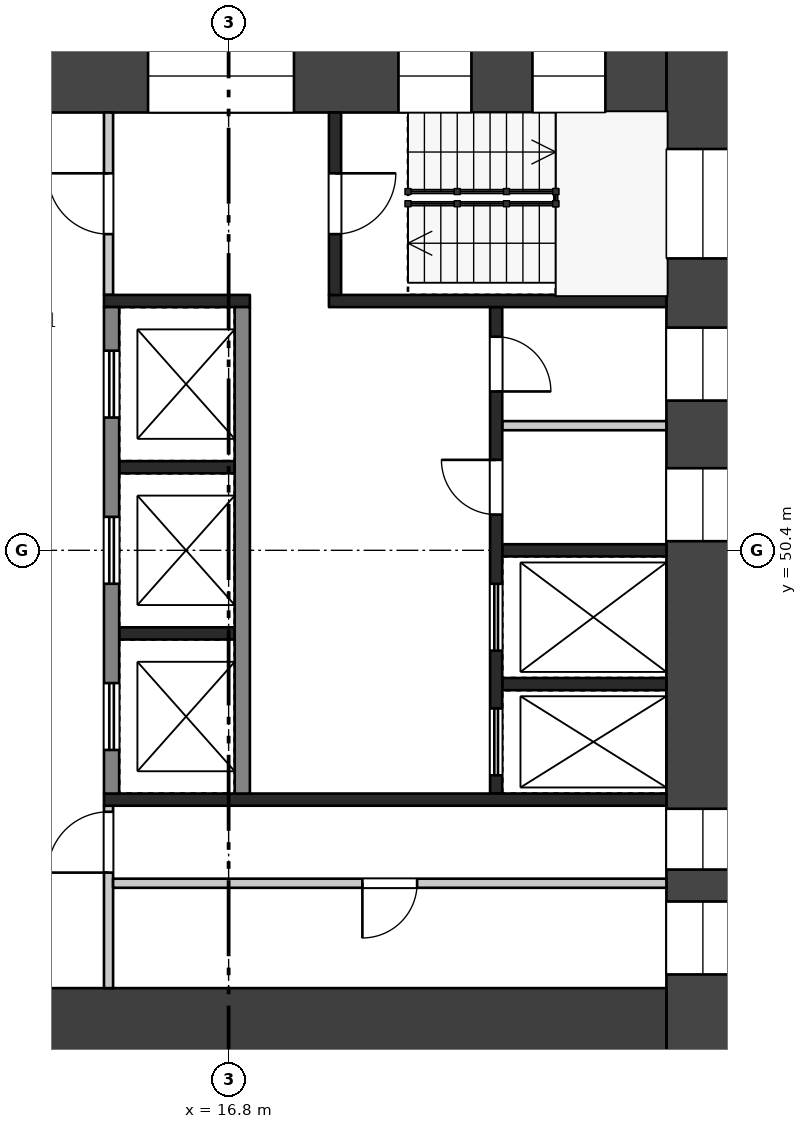
"""IFC4 building model, lengths in metres.
Left out: names, types, materials, properties, quantities, classifications, styles, units other than length and angle.
Written with IfcOpenShell. Run it as: python <this file> out.ifc"""

import sys

from ifc_helpers import new_model, si_unit, direction, frame, frame_2d, origin, place, context, subcontext, project, spatial, rectangle, extrude, element, fill, save


model = new_model("IFC4")
c1 = context("Model", 3, precision=1e-05, world=origin(), true_north=direction((0.0, 1.0)))
c2 = subcontext(c1, "Body", "Model", "MODEL_VIEW")
j1 = project(units=[si_unit("LENGTHUNIT", "METRE"), si_unit("PLANEANGLEUNIT", "RADIAN")], contexts=[c1])
p1 = place(None, origin())
s1 = spatial("IfcSite", under=j1, at=p1, CompositionType="ELEMENT")
p2 = place(p1, origin())
s2 = spatial("IfcBuilding", under=s1, at=p2, CompositionType="ELEMENT")
p3 = place(p2, frame((0.0, 0.0, 168.7)))
s3 = spatial("IfcBuildingStorey", under=s2, at=p3, CompositionType="ELEMENT", Elevation=168.7)
p4 = place(p3, frame((24.6, 58.8, 0.0), z_axis=(0.0, 0.0, 1.0), x_axis=(0.0, -1.0, 0.0)))
e1 = element("IfcWall", 1, at=p4, inside=s3, PredefinedType="SHEAR", context=c2, shape_type="SweptSolid", body=[
    extrude(rectangle(XDim=16.8, YDim=1.2, at=frame_2d((8.4, 0.0))), origin(), (0.0, 0.0, 1.0), 3.22),
])
p5 = place(p4, frame((1.8, 0.0, 0.5)))
e2 = element("IfcOpeningElement", 2, at=p5, cuts=e1, PredefinedType="OPENING", context=c2, shape_type="SweptSolid", body=[
    extrude(rectangle(XDim=1.8, YDim=2.4, at=frame_2d((0.9, 1.2))), frame((0.0, 0.61, 0.0), z_axis=(0.0, -1.0, 0.0), x_axis=(1.0, 0.0, 0.0)), (0.0, 0.0, 1.0), 1.22),
])
p6 = place(p4, frame((4.738, 0.0, 1.6)))
e3 = element("IfcOpeningElement", 3, at=p6, cuts=e1, PredefinedType="OPENING", context=c2, shape_type="SweptSolid", body=[
    extrude(rectangle(XDim=1.2, YDim=1.2, at=frame_2d((0.6, 0.6))), frame((0.0, 0.61, 0.0), z_axis=(0.0, -1.0, 0.0), x_axis=(1.0, 0.0, 0.0)), (0.0, 0.0, 1.0), 1.22),
])
p7 = place(p4, frame((7.05, 0.0, 1.6)))
e4 = element("IfcOpeningElement", 4, at=p7, cuts=e1, PredefinedType="OPENING", context=c2, shape_type="SweptSolid", body=[
    extrude(rectangle(XDim=1.2, YDim=1.2, at=frame_2d((0.6, 0.6))), frame((0.0, 0.61, 0.0), z_axis=(0.0, -1.0, 0.0), x_axis=(1.0, 0.0, 0.0)), (0.0, 0.0, 1.0), 1.22),
])
p8 = place(p4, frame((12.65, 0.0, 0.6)))
e5 = element("IfcOpeningElement", 5, at=p8, cuts=e1, PredefinedType="OPENING", context=c2, shape_type="SweptSolid", body=[
    extrude(rectangle(XDim=1.0, YDim=2.1, at=frame_2d((0.5, 1.05))), frame((0.0, 0.61, 0.0), z_axis=(0.0, -1.0, 0.0), x_axis=(1.0, 0.0, 0.0)), (0.0, 0.0, 1.0), 1.22),
])
p9 = place(p4, frame((14.175, 0.0, 1.6)))
e6 = element("IfcOpeningElement", 6, at=p9, cuts=e1, PredefinedType="OPENING", context=c2, shape_type="SweptSolid", body=[
    extrude(rectangle(XDim=1.2, YDim=1.2, at=frame_2d((0.6, 0.6))), frame((0.0, 0.61, 0.0), z_axis=(0.0, -1.0, 0.0), x_axis=(1.0, 0.0, 0.0)), (0.0, 0.0, 1.0), 1.22),
])
p10 = place(p3, frame((9.6, 58.2, 0.0), z_axis=(0.0, 0.0, 1.0), x_axis=(1.0, 0.0, 0.0)))
e7 = element("IfcWall", 7, at=p10, inside=s3, PredefinedType="SHEAR", context=c2, shape_type="SweptSolid", body=[
    extrude(rectangle(XDim=14.4, YDim=1.2, at=frame_2d((7.2, 0.0))), origin(), (0.0, 0.0, 1.0), 3.22),
])
p11 = place(p10, frame((1.105, 0.0, 0.6)))
e8 = element("IfcOpeningElement", 8, at=p11, cuts=e7, PredefinedType="OPENING", context=c2, shape_type="SweptSolid", body=[
    extrude(rectangle(XDim=3.0, YDim=2.1, at=frame_2d((1.5, 1.05))), frame((0.0, 0.61, 0.0), z_axis=(0.0, -1.0, 0.0), x_axis=(1.0, 0.0, 0.0)), (0.0, 0.0, 1.0), 1.22),
])
p12 = place(p10, frame((5.875, 0.0, 0.6)))
e9 = element("IfcOpeningElement", 9, at=p12, cuts=e7, PredefinedType="OPENING", context=c2, shape_type="SweptSolid", body=[
    extrude(rectangle(XDim=2.4, YDim=2.1, at=frame_2d((1.2, 1.05))), frame((0.0, 0.61, 0.0), z_axis=(0.0, -1.0, 0.0), x_axis=(1.0, 0.0, 0.0)), (0.0, 0.0, 1.0), 1.22),
])
p13 = place(p10, frame((9.993, 0.0, 0.5)))
e10 = element("IfcOpeningElement", 10, at=p13, cuts=e7, PredefinedType="OPENING", context=c2, shape_type="SweptSolid", body=[
    extrude(rectangle(XDim=1.2, YDim=2.4, at=frame_2d((0.6, 1.2))), frame((0.0, 0.61, 0.0), z_axis=(0.0, -1.0, 0.0), x_axis=(1.0, 0.0, 0.0)), (0.0, 0.0, 1.0), 1.22),
])
p14 = place(p10, frame((12.197, 0.0, 0.5)))
e11 = element("IfcOpeningElement", 11, at=p14, cuts=e7, PredefinedType="OPENING", context=c2, shape_type="SweptSolid", body=[
    extrude(rectangle(XDim=1.2, YDim=2.4, at=frame_2d((0.6, 1.2))), frame((0.0, 0.61, 0.0), z_axis=(0.0, -1.0, 0.0), x_axis=(1.0, 0.0, 0.0)), (0.0, 0.0, 1.0), 1.22),
])
p15 = place(p3, frame((9.6, 42.6, 0.0), z_axis=(0.0, 0.0, 1.0), x_axis=(1.0, 0.0, 0.0)))
e12 = element("IfcWall", 12, at=p15, inside=s3, PredefinedType="SHEAR", context=c2, shape_type="SweptSolid", body=[
    extrude(rectangle(XDim=14.4, YDim=1.2, at=frame_2d((7.2, 0.0))), origin(), (0.0, 0.0, 1.0), 3.22),
])
p16 = place(p15, frame((2.1, 0.0, 0.0)))
e13 = element("IfcOpeningElement", 13, at=p16, cuts=e12, PredefinedType="OPENING", context=c2, shape_type="SweptSolid", body=[
    extrude(rectangle(XDim=1.8, YDim=2.1, at=frame_2d((0.9, 1.05))), frame((0.0, 0.61, 0.0), z_axis=(0.0, -1.0, 0.0), x_axis=(1.0, 0.0, 0.0)), (0.0, 0.0, 1.0), 1.22),
])
for number, where, z_axis, x_axis in (
    (14, (15.0, 51.767, 0.0), (0.0, 0.0, 1.0), (1.0, 0.0, 0.0)),
    (15, (15.0, 49.033, 0.0), (0.0, 0.0, 1.0), (1.0, 0.0, 0.0)),
):
    element("IfcWall", number, at=place(p3, frame(where, z_axis=z_axis, x_axis=x_axis)), inside=s3, PredefinedType="SHEAR", context=c2, shape_type="SweptSolid", body=[
        extrude(rectangle(XDim=1.9, YDim=0.2, at=frame_2d((0.95, 0.0))), origin(), (0.0, 0.0, 1.0), 3.22),
    ])
p17 = place(p3, frame((14.875, 54.4, 0.0), z_axis=(0.0, 0.0, 1.0), x_axis=(0.0, -1.0, 0.0)))
e16 = element("IfcWall", 16, at=p17, inside=s3, PredefinedType="SHEAR", context=c2, shape_type="SweptSolid", body=[
    extrude(rectangle(XDim=8.0, YDim=0.25, at=frame_2d((4.0, 0.0))), origin(), (0.0, 0.0, 1.0), 3.22),
])
p18 = place(p17, frame((0.717, 0.0, 0.0)))
e17 = element("IfcOpeningElement", 17, at=p18, cuts=e16, PredefinedType="OPENING", context=c2, shape_type="SweptSolid", body=[
    extrude(rectangle(XDim=1.1, YDim=2.1, at=frame_2d((0.55, 1.05))), frame((0.0, 0.135, 0.0), z_axis=(0.0, -1.0, 0.0), x_axis=(1.0, 0.0, 0.0)), (0.0, 0.0, 1.0), 0.27),
])
p19 = place(p17, frame((3.45, 0.0, 0.0)))
e18 = element("IfcOpeningElement", 18, at=p19, cuts=e16, PredefinedType="OPENING", context=c2, shape_type="SweptSolid", body=[
    extrude(rectangle(XDim=1.1, YDim=2.1, at=frame_2d((0.55, 1.05))), frame((0.0, 0.135, 0.0), z_axis=(0.0, -1.0, 0.0), x_axis=(1.0, 0.0, 0.0)), (0.0, 0.0, 1.0), 0.27),
])
p20 = place(p17, frame((6.183, 0.0, 0.0)))
e19 = element("IfcOpeningElement", 19, at=p20, cuts=e16, PredefinedType="OPENING", context=c2, shape_type="SweptSolid", body=[
    extrude(rectangle(XDim=1.1, YDim=2.1, at=frame_2d((0.55, 1.05))), frame((0.0, 0.135, 0.0), z_axis=(0.0, -1.0, 0.0), x_axis=(1.0, 0.0, 0.0)), (0.0, 0.0, 1.0), 0.27),
])
p21 = place(p3, frame((17.025, 54.4, 0.0), z_axis=(0.0, 0.0, 1.0), x_axis=(0.0, -1.0, 0.0)))
e20 = element("IfcWall", 20, at=p21, inside=s3, PredefinedType="SHEAR", context=c2, shape_type="SweptSolid", body=[
    extrude(rectangle(XDim=8.0, YDim=0.25, at=frame_2d((4.0, 0.0))), origin(), (0.0, 0.0, 1.0), 3.22),
])
for number, where, z_axis, x_axis in (
    (21, (21.3, 50.4, 0.0), (0.0, 0.0, 1.0), (1.0, 0.0, 0.0)),
    (22, (21.3, 48.2, 0.0), (0.0, 0.0, 1.0), (1.0, 0.0, 0.0)),
):
    element("IfcWall", number, at=place(p3, frame(where, z_axis=z_axis, x_axis=x_axis)), inside=s3, PredefinedType="SHEAR", context=c2, shape_type="SweptSolid", body=[
        extrude(rectangle(XDim=2.7, YDim=0.2, at=frame_2d((1.35, 0.0))), origin(), (0.0, 0.0, 1.0), 3.22),
    ])
p22 = place(p3, frame((21.3, 52.45, 0.0), z_axis=(0.0, 0.0, 1.0), x_axis=(1.0, 0.0, 0.0)))
e23 = element("IfcWall", 23, at=p22, inside=s3, PredefinedType="PARTITIONING", context=c2, shape_type="SweptSolid", body=[
    extrude(rectangle(XDim=2.7, YDim=0.15, at=frame_2d((1.35, 0.0))), origin(), (0.0, 0.0, 1.0), 3.22),
])
p23 = place(p3, frame((21.2, 54.4, 0.0), z_axis=(0.0, 0.0, 1.0), x_axis=(0.0, -1.0, 0.0)))
e24 = element("IfcWall", 24, at=p23, inside=s3, PredefinedType="SHEAR", context=c2, shape_type="SweptSolid", body=[
    extrude(rectangle(XDim=8.0, YDim=0.2, at=frame_2d((4.0, 0.0))), origin(), (0.0, 0.0, 1.0), 3.22),
])
p24 = place(p23, frame((0.488, 0.0, 0.0)))
e25 = element("IfcOpeningElement", 25, at=p24, cuts=e24, PredefinedType="OPENING", context=c2, shape_type="SweptSolid", body=[
    extrude(rectangle(XDim=0.9, YDim=2.1, at=frame_2d((0.45, 1.05))), frame((0.0, 0.11, 0.0), z_axis=(0.0, -1.0, 0.0), x_axis=(1.0, 0.0, 0.0)), (0.0, 0.0, 1.0), 0.22),
])
p25 = place(p23, frame((2.512, 0.0, 0.0)))
e26 = element("IfcOpeningElement", 26, at=p25, cuts=e24, PredefinedType="OPENING", context=c2, shape_type="SweptSolid", body=[
    extrude(rectangle(XDim=0.9, YDim=2.1, at=frame_2d((0.45, 1.05))), frame((0.0, 0.11, 0.0), z_axis=(0.0, -1.0, 0.0), x_axis=(1.0, 0.0, 0.0)), (0.0, 0.0, 1.0), 0.22),
])
p26 = place(p23, frame((4.55, 0.0, 0.0)))
e27 = element("IfcOpeningElement", 27, at=p26, cuts=e24, PredefinedType="OPENING", context=c2, shape_type="SweptSolid", body=[
    extrude(rectangle(XDim=1.1, YDim=2.1, at=frame_2d((0.55, 1.05))), frame((0.0, 0.11, 0.0), z_axis=(0.0, -1.0, 0.0), x_axis=(1.0, 0.0, 0.0)), (0.0, 0.0, 1.0), 0.22),
])
p27 = place(p23, frame((6.6, 0.0, 0.0)))
e28 = element("IfcOpeningElement", 28, at=p27, cuts=e24, PredefinedType="OPENING", context=c2, shape_type="SweptSolid", body=[
    extrude(rectangle(XDim=1.1, YDim=2.1, at=frame_2d((0.55, 1.05))), frame((0.0, 0.11, 0.0), z_axis=(0.0, -1.0, 0.0), x_axis=(1.0, 0.0, 0.0)), (0.0, 0.0, 1.0), 0.22),
])
p28 = place(p3, frame((14.75, 54.5, 0.0), z_axis=(0.0, 0.0, 1.0), x_axis=(1.0, 0.0, 0.0)))
e29 = element("IfcWall", 29, at=p28, inside=s3, PredefinedType="SHEAR", context=c2, shape_type="SweptSolid", body=[
    extrude(rectangle(XDim=2.4, YDim=0.2, at=frame_2d((1.2, 0.0))), origin(), (0.0, 0.0, 1.0), 3.22),
])
p29 = place(p3, frame((18.45, 54.5, 0.0), z_axis=(0.0, 0.0, 1.0), x_axis=(1.0, 0.0, 0.0)))
e30 = element("IfcWall", 30, at=p29, inside=s3, PredefinedType="SHEAR", context=c2, shape_type="SweptSolid", body=[
    extrude(rectangle(XDim=5.55, YDim=0.2, at=frame_2d((2.775, 0.0))), origin(), (0.0, 0.0, 1.0), 3.22),
])
p30 = place(p3, frame((14.825, 57.6, 0.0), z_axis=(0.0, 0.0, 1.0), x_axis=(0.0, -1.0, 0.0)))
e31 = element("IfcWall", 31, at=p30, inside=s3, PredefinedType="PARTITIONING", context=c2, shape_type="SweptSolid", body=[
    extrude(rectangle(XDim=3.0, YDim=0.15, at=frame_2d((1.5, 0.0))), origin(), (0.0, 0.0, 1.0), 3.22),
])
p31 = place(p30, frame((1.0, 0.0, 0.0)))
e32 = element("IfcOpeningElement", 32, at=p31, cuts=e31, PredefinedType="OPENING", context=c2, shape_type="SweptSolid", body=[
    extrude(rectangle(XDim=1.0, YDim=2.1, at=frame_2d((0.5, 1.05))), frame((0.0, 0.085, 0.0), z_axis=(0.0, -1.0, 0.0), x_axis=(1.0, 0.0, 0.0)), (0.0, 0.0, 1.0), 0.17),
])
p32 = place(p3, frame((18.55, 57.6, 0.0), z_axis=(0.0, 0.0, 1.0), x_axis=(0.0, -1.0, 0.0)))
e33 = element("IfcWall", 33, at=p32, inside=s3, PredefinedType="SHEAR", context=c2, shape_type="SweptSolid", body=[
    extrude(rectangle(XDim=3.0, YDim=0.2, at=frame_2d((1.5, 0.0))), origin(), (0.0, 0.0, 1.0), 3.22),
])
p33 = place(p32, frame((1.0, 0.0, 0.0)))
e34 = element("IfcOpeningElement", 34, at=p33, cuts=e33, PredefinedType="OPENING", context=c2, shape_type="SweptSolid", body=[
    extrude(rectangle(XDim=1.0, YDim=2.1, at=frame_2d((0.5, 1.05))), frame((0.0, 0.11, 0.0), z_axis=(0.0, -1.0, 0.0), x_axis=(1.0, 0.0, 0.0)), (0.0, 0.0, 1.0), 0.22),
])
p34 = place(p3, frame((14.75, 46.3, 0.0), z_axis=(0.0, 0.0, 1.0), x_axis=(1.0, 0.0, 0.0)))
e35 = element("IfcWall", 35, at=p34, inside=s3, PredefinedType="SHEAR", context=c2, shape_type="SweptSolid", body=[
    extrude(rectangle(XDim=9.25, YDim=0.2, at=frame_2d((4.625, 0.0))), origin(), (0.0, 0.0, 1.0), 3.22),
])
p35 = place(p3, frame((14.825, 46.2, 0.0), z_axis=(0.0, 0.0, 1.0), x_axis=(0.0, -1.0, 0.0)))
e36 = element("IfcWall", 36, at=p35, inside=s3, PredefinedType="PARTITIONING", context=c2, shape_type="SweptSolid", body=[
    extrude(rectangle(XDim=3.0, YDim=0.15, at=frame_2d((1.5, 0.0))), origin(), (0.0, 0.0, 1.0), 3.22),
])
p36 = place(p35, frame((0.1, 0.0, 0.0)))
e37 = element("IfcOpeningElement", 37, at=p36, cuts=e36, PredefinedType="OPENING", context=c2, shape_type="SweptSolid", body=[
    extrude(rectangle(XDim=1.0, YDim=2.1, at=frame_2d((0.5, 1.05))), frame((0.0, 0.085, 0.0), z_axis=(0.0, -1.0, 0.0), x_axis=(1.0, 0.0, 0.0)), (0.0, 0.0, 1.0), 0.17),
])
p37 = place(p3, frame((14.9, 44.925, 0.0), z_axis=(0.0, 0.0, 1.0), x_axis=(1.0, 0.0, 0.0)))
e38 = element("IfcWall", 38, at=p37, inside=s3, PredefinedType="PARTITIONING", context=c2, shape_type="SweptSolid", body=[
    extrude(rectangle(XDim=9.1, YDim=0.15, at=frame_2d((4.55, 0.0))), origin(), (0.0, 0.0, 1.0), 3.22),
])
p38 = place(p37, frame((4.1, 0.0, 0.0)))
e39 = element("IfcOpeningElement", 39, at=p38, cuts=e38, PredefinedType="OPENING", context=c2, shape_type="SweptSolid", body=[
    extrude(rectangle(XDim=0.9, YDim=2.1, at=frame_2d((0.45, 1.05))), frame((0.0, 0.085, 0.0), z_axis=(0.0, -1.0, 0.0), x_axis=(1.0, 0.0, 0.0)), (0.0, 0.0, 1.0), 0.17),
])
p39 = place(p18, origin())
e40 = element("IfcDoor", 40, at=p39, inside=s3, OperationType="DOUBLE_DOOR_SLIDING", PredefinedType="DOOR", context=c2, shape_type="SweptSolid", body=[
    extrude(rectangle(XDim=1.1, YDim=2.1, at=frame_2d((0.55, 1.05))), frame((0.0, 0.025, 0.0), z_axis=(0.0, -1.0, 0.0), x_axis=(1.0, 0.0, 0.0)), (0.0, 0.0, 1.0), 0.05),
])
fill(e17, e40)
p40 = place(p19, origin())
e41 = element("IfcDoor", 41, at=p40, inside=s3, OperationType="DOUBLE_DOOR_SLIDING", PredefinedType="DOOR", context=c2, shape_type="SweptSolid", body=[
    extrude(rectangle(XDim=1.1, YDim=2.1, at=frame_2d((0.55, 1.05))), frame((0.0, 0.025, 0.0), z_axis=(0.0, -1.0, 0.0), x_axis=(1.0, 0.0, 0.0)), (0.0, 0.0, 1.0), 0.05),
])
fill(e18, e41)
p41 = place(p20, origin())
e42 = element("IfcDoor", 42, at=p41, inside=s3, OperationType="DOUBLE_DOOR_SLIDING", PredefinedType="DOOR", context=c2, shape_type="SweptSolid", body=[
    extrude(rectangle(XDim=1.1, YDim=2.1, at=frame_2d((0.55, 1.05))), frame((0.0, 0.025, 0.0), z_axis=(0.0, -1.0, 0.0), x_axis=(1.0, 0.0, 0.0)), (0.0, 0.0, 1.0), 0.05),
])
fill(e19, e42)
p42 = place(p24, origin())
e43 = element("IfcDoor", 43, at=p42, inside=s3, OperationType="SINGLE_SWING_RIGHT", PredefinedType="DOOR", context=c2, shape_type="SweptSolid", body=[
    extrude(rectangle(XDim=0.9, YDim=2.1, at=frame_2d((0.45, 1.05))), frame((0.0, 0.025, 0.0), z_axis=(0.0, -1.0, 0.0), x_axis=(1.0, 0.0, 0.0)), (0.0, 0.0, 1.0), 0.05),
])
fill(e25, e43)
p43 = place(p25, frame((0.9, 0.0, 0.0), z_axis=(0.0, 0.0, 1.0), x_axis=(-1.0, 0.0, 0.0)))
e44 = element("IfcDoor", 44, at=p43, inside=s3, OperationType="SINGLE_SWING_RIGHT", PredefinedType="DOOR", context=c2, shape_type="SweptSolid", body=[
    extrude(rectangle(XDim=0.9, YDim=2.1, at=frame_2d((0.45, 1.05))), frame((0.0, 0.025, 0.0), z_axis=(0.0, -1.0, 0.0), x_axis=(1.0, 0.0, 0.0)), (0.0, 0.0, 1.0), 0.05),
])
fill(e26, e44)
p44 = place(p26, origin())
e45 = element("IfcDoor", 45, at=p44, inside=s3, OperationType="DOUBLE_DOOR_SLIDING", PredefinedType="DOOR", context=c2, shape_type="SweptSolid", body=[
    extrude(rectangle(XDim=1.1, YDim=2.1, at=frame_2d((0.55, 1.05))), frame((0.0, 0.025, 0.0), z_axis=(0.0, -1.0, 0.0), x_axis=(1.0, 0.0, 0.0)), (0.0, 0.0, 1.0), 0.05),
])
fill(e27, e45)
p45 = place(p27, origin())
e46 = element("IfcDoor", 46, at=p45, inside=s3, OperationType="DOUBLE_DOOR_SLIDING", PredefinedType="DOOR", context=c2, shape_type="SweptSolid", body=[
    extrude(rectangle(XDim=1.1, YDim=2.1, at=frame_2d((0.55, 1.05))), frame((0.0, 0.025, 0.0), z_axis=(0.0, -1.0, 0.0), x_axis=(1.0, 0.0, 0.0)), (0.0, 0.0, 1.0), 0.05),
])
fill(e28, e46)
p46 = place(p31, frame((1.0, 0.0, 0.0), z_axis=(0.0, 0.0, 1.0), x_axis=(-1.0, 0.0, 0.0)))
e47 = element("IfcDoor", 47, at=p46, inside=s3, OperationType="SINGLE_SWING_RIGHT", PredefinedType="DOOR", context=c2, shape_type="SweptSolid", body=[
    extrude(rectangle(XDim=1.0, YDim=2.1, at=frame_2d((0.5, 1.05))), frame((0.0, 0.025, 0.0), z_axis=(0.0, -1.0, 0.0), x_axis=(1.0, 0.0, 0.0)), (0.0, 0.0, 1.0), 0.05),
])
fill(e32, e47)
p47 = place(p33, origin())
e48 = element("IfcDoor", 48, at=p47, inside=s3, OperationType="SINGLE_SWING_LEFT", PredefinedType="DOOR", context=c2, shape_type="SweptSolid", body=[
    extrude(rectangle(XDim=1.0, YDim=2.1, at=frame_2d((0.5, 1.05))), frame((0.0, 0.025, 0.0), z_axis=(0.0, -1.0, 0.0), x_axis=(1.0, 0.0, 0.0)), (0.0, 0.0, 1.0), 0.05),
])
fill(e34, e48)
p48 = place(p36, frame((1.0, 0.0, 0.0), z_axis=(0.0, 0.0, 1.0), x_axis=(-1.0, 0.0, 0.0)))
e49 = element("IfcDoor", 49, at=p48, inside=s3, OperationType="SINGLE_SWING_LEFT", PredefinedType="DOOR", context=c2, shape_type="SweptSolid", body=[
    extrude(rectangle(XDim=1.0, YDim=2.1, at=frame_2d((0.5, 1.05))), frame((0.0, 0.025, 0.0), z_axis=(0.0, -1.0, 0.0), x_axis=(1.0, 0.0, 0.0)), (0.0, 0.0, 1.0), 0.05),
])
fill(e37, e49)
p49 = place(p38, frame((0.9, 0.0, 0.0), z_axis=(0.0, 0.0, 1.0), x_axis=(-1.0, 0.0, 0.0)))
e50 = element("IfcDoor", 50, at=p49, inside=s3, OperationType="SINGLE_SWING_RIGHT", PredefinedType="DOOR", context=c2, shape_type="SweptSolid", body=[
    extrude(rectangle(XDim=0.9, YDim=2.1, at=frame_2d((0.45, 1.05))), frame((0.0, 0.025, 0.0), z_axis=(0.0, -1.0, 0.0), x_axis=(1.0, 0.0, 0.0)), (0.0, 0.0, 1.0), 0.05),
])
fill(e39, e50)
p50 = place(p5, origin())
e51 = element("IfcWindow", 51, at=p50, inside=s3, PartitioningType="SINGLE_PANEL", PredefinedType="WINDOW", context=c2, shape_type="SweptSolid", body=[
    extrude(rectangle(XDim=1.8, YDim=2.4, at=frame_2d((0.9, 1.2))), frame((0.0, 0.03, 0.0), z_axis=(0.0, -1.0, 0.0), x_axis=(1.0, 0.0, 0.0)), (0.0, 0.0, 1.0), 0.06),
])
fill(e2, e51)
p51 = place(p6, origin())
e52 = element("IfcWindow", 52, at=p51, inside=s3, PartitioningType="SINGLE_PANEL", PredefinedType="WINDOW", context=c2, shape_type="SweptSolid", body=[
    extrude(rectangle(XDim=1.2, YDim=1.2, at=frame_2d((0.6, 0.6))), frame((0.0, 0.03, 0.0), z_axis=(0.0, -1.0, 0.0), x_axis=(1.0, 0.0, 0.0)), (0.0, 0.0, 1.0), 0.06),
])
fill(e3, e52)
p52 = place(p7, origin())
e53 = element("IfcWindow", 53, at=p52, inside=s3, PartitioningType="SINGLE_PANEL", PredefinedType="WINDOW", context=c2, shape_type="SweptSolid", body=[
    extrude(rectangle(XDim=1.2, YDim=1.2, at=frame_2d((0.6, 0.6))), frame((0.0, 0.03, 0.0), z_axis=(0.0, -1.0, 0.0), x_axis=(1.0, 0.0, 0.0)), (0.0, 0.0, 1.0), 0.06),
])
fill(e4, e53)
p53 = place(p8, origin())
e54 = element("IfcWindow", 54, at=p53, inside=s3, PartitioningType="SINGLE_PANEL", PredefinedType="WINDOW", context=c2, shape_type="SweptSolid", body=[
    extrude(rectangle(XDim=1.0, YDim=2.1, at=frame_2d((0.5, 1.05))), frame((0.0, 0.03, 0.0), z_axis=(0.0, -1.0, 0.0), x_axis=(1.0, 0.0, 0.0)), (0.0, 0.0, 1.0), 0.06),
])
fill(e5, e54)
p54 = place(p9, origin())
e55 = element("IfcWindow", 55, at=p54, inside=s3, PartitioningType="SINGLE_PANEL", PredefinedType="WINDOW", context=c2, shape_type="SweptSolid", body=[
    extrude(rectangle(XDim=1.2, YDim=1.2, at=frame_2d((0.6, 0.6))), frame((0.0, 0.03, 0.0), z_axis=(0.0, -1.0, 0.0), x_axis=(1.0, 0.0, 0.0)), (0.0, 0.0, 1.0), 0.06),
])
fill(e6, e55)
p55 = place(p12, origin())
e56 = element("IfcWindow", 56, at=p55, inside=s3, PartitioningType="SINGLE_PANEL", PredefinedType="WINDOW", context=c2, shape_type="SweptSolid", body=[
    extrude(rectangle(XDim=2.4, YDim=2.1, at=frame_2d((1.2, 1.05))), frame((0.0, 0.03, 0.0), z_axis=(0.0, -1.0, 0.0), x_axis=(1.0, 0.0, 0.0)), (0.0, 0.0, 1.0), 0.06),
])
fill(e9, e56)
p56 = place(p13, origin())
e57 = element("IfcWindow", 57, at=p56, inside=s3, PartitioningType="SINGLE_PANEL", PredefinedType="WINDOW", context=c2, shape_type="SweptSolid", body=[
    extrude(rectangle(XDim=1.2, YDim=2.4, at=frame_2d((0.6, 1.2))), frame((0.0, 0.03, 0.0), z_axis=(0.0, -1.0, 0.0), x_axis=(1.0, 0.0, 0.0)), (0.0, 0.0, 1.0), 0.06),
])
fill(e10, e57)
p57 = place(p14, origin())
e58 = element("IfcWindow", 58, at=p57, inside=s3, PartitioningType="SINGLE_PANEL", PredefinedType="WINDOW", context=c2, shape_type="SweptSolid", body=[
    extrude(rectangle(XDim=1.2, YDim=2.4, at=frame_2d((0.6, 1.2))), frame((0.0, 0.03, 0.0), z_axis=(0.0, -1.0, 0.0), x_axis=(1.0, 0.0, 0.0)), (0.0, 0.0, 1.0), 0.06),
])
fill(e11, e58)
save(model, sys.argv[1])
